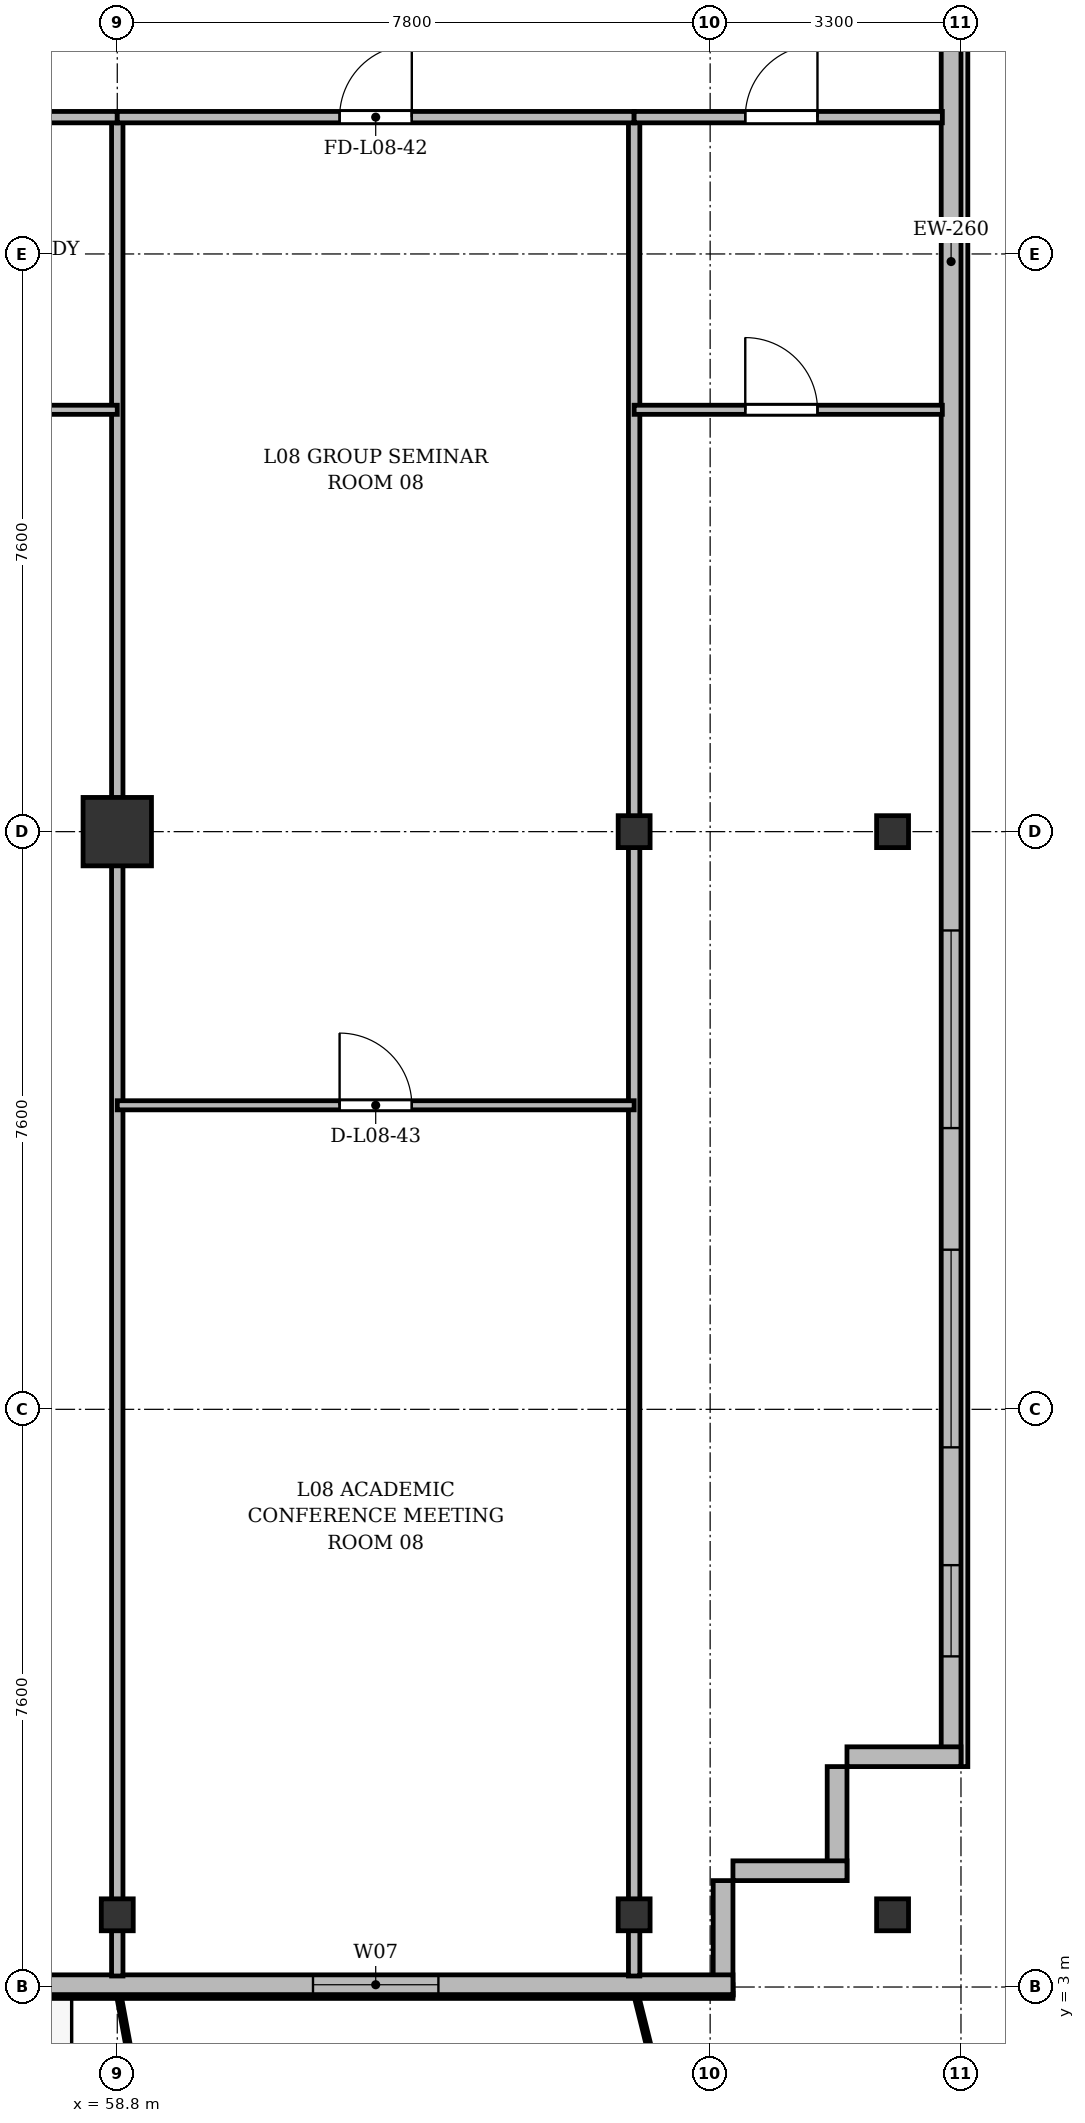
"""IFC4 building model, lengths in metres.
Left out: names, types, materials, properties, quantities, classifications, styles, units other than length and angle.
Written with IfcOpenShell. Run it as: python <this file> out.ifc"""

import sys

from ifc_helpers import new_model, si_unit, direction, frame, frame_2d, origin, origin_2d, place, context, subcontext, project, spatial, rectangle, i_section, extrude, source, transform, mapped, element, fill, save


model = new_model("IFC4")
c1 = context("Model", 3, precision=1e-05, world=origin(), true_north=direction((0.0, 1.0)))
c2 = subcontext(c1, "Body", "Model", "MODEL_VIEW")
j1 = project(units=[si_unit("LENGTHUNIT", "METRE"), si_unit("PLANEANGLEUNIT", "RADIAN")], contexts=[c1])
p1 = place(None, origin())
s1 = spatial("IfcSite", under=j1, at=p1, CompositionType="ELEMENT")
p2 = place(p1, origin())
s2 = spatial("IfcBuilding", under=s1, at=p2, CompositionType="ELEMENT")
p3 = place(p2, frame((0.0, 0.0, 34.3)))
s3 = spatial("IfcBuildingStorey", under=s2, at=p3, CompositionType="ELEMENT", Elevation=34.3)
m1 = source(origin(), c2, "Body", "SweptSolid", [
    extrude(i_section(OverallWidth=0.42, OverallDepth=0.42, WebThickness=0.026, FlangeThickness=0.04, at=origin_2d()), origin(), (0.0, 0.0, 1.0), 3.6),
])
p4 = place(p3, frame((58.8, 3.95, 0.0), z_axis=(0.0, 0.0, 1.0), x_axis=(1.0, 0.0, 0.0)))
e1 = element("IfcColumn", 1, at=p4, inside=s3, PredefinedType="COLUMN", context=c2, shape_type="MappedRepresentation", body=[
    mapped(m1, transform((0.0, 0.0, 0.0), x_axis=(1.0, 0.0, 0.0), y_axis=(0.0, 1.0, 0.0), z_axis=(0.0, 0.0, 1.0), scale=1.0)),
])
m2 = source(origin(), c2, "Body", "SweptSolid", [
    extrude(rectangle(XDim=0.9, YDim=0.9, at=origin_2d()), origin(), (0.0, 0.0, 1.0), 3.6),
])
p5 = place(p3, frame((58.8, 18.2, 0.0), z_axis=(0.0, 0.0, 1.0), x_axis=(1.0, 0.0, 0.0)))
e2 = element("IfcColumn", 2, at=p5, inside=s3, PredefinedType="COLUMN", context=c2, shape_type="MappedRepresentation", body=[
    mapped(m2, transform((0.0, 0.0, 0.0), x_axis=(1.0, 0.0, 0.0), y_axis=(0.0, 1.0, 0.0), z_axis=(0.0, 0.0, 1.0), scale=1.0)),
])
for number, where, z_axis, x_axis in (
    (3, (65.6, 3.95, 0.0), (0.0, 0.0, 1.0), (1.0, 0.0, 0.0)),
    (4, (65.6, 18.2, 0.0), (0.0, 0.0, 1.0), (1.0, 0.0, 0.0)),
    (5, (69.0, 3.95, 0.0), (0.0, 0.0, 1.0), (1.0, 0.0, 0.0)),
    (6, (69.0, 18.2, 0.0), (0.0, 0.0, 1.0), (1.0, 0.0, 0.0)),
):
    element("IfcColumn", number, at=place(p3, frame(where, z_axis=z_axis, x_axis=x_axis)), inside=s3, PredefinedType="COLUMN", context=c2, shape_type="MappedRepresentation", body=[
        mapped(m1, transform((0.0, 0.0, 0.0), x_axis=(1.0, 0.0, 0.0), y_axis=(0.0, 1.0, 0.0), z_axis=(0.0, 0.0, 1.0), scale=1.0)),
    ])
p6 = place(p3, frame((69.77, 45.5, 0.0), z_axis=(0.0, 0.0, 1.0), x_axis=(0.0, -1.0, 0.0)))
e7 = element("IfcWall", 7, at=p6, inside=s3, PredefinedType="SOLIDWALL", context=c2, shape_type="SweptSolid", body=[
    extrude(rectangle(XDim=39.6, YDim=0.26, at=frame_2d((19.8, 0.0))), origin(), (0.0, 0.0, 1.0), 3.34),
])
p7 = place(p6, frame((36.95, 0.0, 0.92)))
e8 = element("IfcOpeningElement", 8, at=p7, cuts=e7, PredefinedType="OPENING", context=c2, shape_type="SweptSolid", body=[
    extrude(rectangle(XDim=1.2, YDim=1.65, at=frame_2d((0.6, 0.825))), frame((0.0, 0.14, 0.0), z_axis=(0.0, -1.0, 0.0), x_axis=(1.0, 0.0, 0.0)), (0.0, 0.0, 1.0), 0.28),
])
p8 = place(p6, frame((32.8, 0.0, 0.92)))
e9 = element("IfcOpeningElement", 9, at=p8, cuts=e7, PredefinedType="OPENING", context=c2, shape_type="SweptSolid", body=[
    extrude(rectangle(XDim=2.6, YDim=1.9, at=frame_2d((1.3, 0.95))), frame((0.0, 0.14, 0.0), z_axis=(0.0, -1.0, 0.0), x_axis=(1.0, 0.0, 0.0)), (0.0, 0.0, 1.0), 0.28),
])
p9 = place(p6, frame((28.6, 0.0, 0.92)))
e10 = element("IfcOpeningElement", 10, at=p9, cuts=e7, PredefinedType="OPENING", context=c2, shape_type="SweptSolid", body=[
    extrude(rectangle(XDim=2.6, YDim=1.9, at=frame_2d((1.3, 0.95))), frame((0.0, 0.14, 0.0), z_axis=(0.0, -1.0, 0.0), x_axis=(1.0, 0.0, 0.0)), (0.0, 0.0, 1.0), 0.28),
])
p10 = place(p6, frame((7.4, 0.0, 0.92)))
e11 = element("IfcOpeningElement", 11, at=p10, cuts=e7, PredefinedType="OPENING", context=c2, shape_type="SweptSolid", body=[
    extrude(rectangle(XDim=2.6, YDim=1.9, at=frame_2d((1.3, 0.95))), frame((0.0, 0.14, 0.0), z_axis=(0.0, -1.0, 0.0), x_axis=(1.0, 0.0, 0.0)), (0.0, 0.0, 1.0), 0.28),
])
p11 = place(p6, frame((4.5, 0.0, 0.92)))
e12 = element("IfcOpeningElement", 12, at=p11, cuts=e7, PredefinedType="OPENING", context=c2, shape_type="SweptSolid", body=[
    extrude(rectangle(XDim=1.2, YDim=1.65, at=frame_2d((0.6, 0.825))), frame((0.0, 0.14, 0.0), z_axis=(0.0, -1.0, 0.0), x_axis=(1.0, 0.0, 0.0)), (0.0, 0.0, 1.0), 0.28),
])
p12 = place(p6, frame((1.15, 0.0, 0.92)))
e13 = element("IfcOpeningElement", 13, at=p12, cuts=e7, PredefinedType="OPENING", context=c2, shape_type="SweptSolid", body=[
    extrude(rectangle(XDim=1.2, YDim=1.65, at=frame_2d((0.6, 0.825))), frame((0.0, 0.14, 0.0), z_axis=(0.0, -1.0, 0.0), x_axis=(1.0, 0.0, 0.0)), (0.0, 0.0, 1.0), 0.28),
])
p13 = place(p3, frame((69.9, 6.03, 0.0), z_axis=(0.0, 0.0, 1.0), x_axis=(-1.0, 0.0, 0.0)))
e14 = element("IfcWall", 14, at=p13, inside=s3, PredefinedType="SOLIDWALL", context=c2, shape_type="SweptSolid", body=[
    extrude(rectangle(XDim=1.5, YDim=0.26, at=frame_2d((0.75, 0.0))), origin(), (0.0, 0.0, 1.0), 2.752),
])
for number, where, z_axis, x_axis in (
    (15, (68.27, 5.9, 0.0), (0.0, 0.0, 1.0), (0.0, -1.0, 0.0)),
    (16, (68.4, 4.53, 0.0), (0.0, 0.0, 1.0), (-1.0, 0.0, 0.0)),
):
    element("IfcWall", number, at=place(p3, frame(where, z_axis=z_axis, x_axis=x_axis)), inside=s3, PredefinedType="SOLIDWALL", context=c2, shape_type="SweptSolid", body=[
        extrude(rectangle(XDim=1.5, YDim=0.26, at=frame_2d((0.75, 0.0))), origin(), (0.0, 0.0, 1.0), 3.34),
    ])
p14 = place(p3, frame((66.77, 4.4, 0.0), z_axis=(0.0, 0.0, 1.0), x_axis=(0.0, -1.0, 0.0)))
e17 = element("IfcWall", 17, at=p14, inside=s3, PredefinedType="SOLIDWALL", context=c2, shape_type="SweptSolid", body=[
    extrude(rectangle(XDim=1.5, YDim=0.26, at=frame_2d((0.75, 0.0))), origin(), (0.0, 0.0, 1.0), 2.69),
])
p15 = place(p3, frame((66.9, 3.03, 0.0), z_axis=(0.0, 0.0, 1.0), x_axis=(-1.0, 0.0, 0.0)))
e18 = element("IfcWall", 18, at=p15, inside=s3, PredefinedType="SOLIDWALL", context=c2, shape_type="SweptSolid", body=[
    extrude(rectangle(XDim=59.4, YDim=0.26, at=frame_2d((29.7, 0.0))), origin(), (0.0, 0.0, 1.0), 3.34),
])
p16 = place(p15, frame((3.875, 0.0, 0.9)))
e19 = element("IfcOpeningElement", 19, at=p16, cuts=e18, PredefinedType="OPENING", context=c2, shape_type="SweptSolid", body=[
    extrude(rectangle(XDim=1.65, YDim=1.85, at=frame_2d((0.825, 0.925))), frame((0.0, 0.14, 0.0), z_axis=(0.0, -1.0, 0.0), x_axis=(1.0, 0.0, 0.0)), (0.0, 0.0, 1.0), 0.28),
])
p17 = place(p15, frame((9.565, 0.0, 0.0)))
e20 = element("IfcOpeningElement", 20, at=p17, cuts=e18, PredefinedType="OPENING", context=c2, shape_type="SweptSolid", body=[
    extrude(rectangle(XDim=1.2, YDim=2.2, at=frame_2d((0.6, 1.1))), frame((0.0, 0.14, 0.0), z_axis=(0.0, -1.0, 0.0), x_axis=(1.0, 0.0, 0.0)), (0.0, 0.0, 1.0), 0.28),
])
p18 = place(p15, frame((18.4, 0.0, 0.9)))
e21 = element("IfcOpeningElement", 21, at=p18, cuts=e18, PredefinedType="OPENING", context=c2, shape_type="SweptSolid", body=[
    extrude(rectangle(XDim=2.2, YDim=1.8, at=frame_2d((1.1, 0.9))), frame((0.0, 0.14, 0.0), z_axis=(0.0, -1.0, 0.0), x_axis=(1.0, 0.0, 0.0)), (0.0, 0.0, 1.0), 0.28),
])
p19 = place(p15, frame((28.95, 0.0, 0.9)))
e22 = element("IfcOpeningElement", 22, at=p19, cuts=e18, PredefinedType="OPENING", context=c2, shape_type="SweptSolid", body=[
    extrude(rectangle(XDim=1.5, YDim=1.75, at=frame_2d((0.75, 0.875))), frame((0.0, 0.14, 0.0), z_axis=(0.0, -1.0, 0.0), x_axis=(1.0, 0.0, 0.0)), (0.0, 0.0, 1.0), 0.28),
])
p20 = place(p15, frame((40.301, 0.0, 0.0)))
e23 = element("IfcOpeningElement", 23, at=p20, cuts=e18, PredefinedType="OPENING", context=c2, shape_type="SweptSolid", body=[
    extrude(rectangle(XDim=1.2, YDim=2.2, at=frame_2d((0.6, 1.1))), frame((0.0, 0.14, 0.0), z_axis=(0.0, -1.0, 0.0), x_axis=(1.0, 0.0, 0.0)), (0.0, 0.0, 1.0), 0.28),
])
p21 = place(p15, frame((46.575, 0.0, 0.9)))
e24 = element("IfcOpeningElement", 24, at=p21, cuts=e18, PredefinedType="OPENING", context=c2, shape_type="SweptSolid", body=[
    extrude(rectangle(XDim=1.65, YDim=1.85, at=frame_2d((0.825, 0.925))), frame((0.0, 0.14, 0.0), z_axis=(0.0, -1.0, 0.0), x_axis=(1.0, 0.0, 0.0)), (0.0, 0.0, 1.0), 0.28),
])
p22 = place(p15, frame((55.817, 0.0, 0.0)))
e25 = element("IfcOpeningElement", 25, at=p22, cuts=e18, PredefinedType="OPENING", context=c2, shape_type="SweptSolid", body=[
    extrude(rectangle(XDim=1.2, YDim=2.2, at=frame_2d((0.6, 1.1))), frame((0.0, 0.14, 0.0), z_axis=(0.0, -1.0, 0.0), x_axis=(1.0, 0.0, 0.0)), (0.0, 0.0, 1.0), 0.28),
])
for number, where, z_axis, x_axis in (
    (26, (58.8, 3.145, 0.0), (0.0, 0.0, 1.0), (0.0, 1.0, 0.0)),
    (27, (65.6, 3.145, 0.0), (0.0, 0.0, 1.0), (0.0, 1.0, 0.0)),
):
    element("IfcWall", number, at=place(p3, frame(where, z_axis=z_axis, x_axis=x_axis)), inside=s3, PredefinedType="PARTITIONING", context=c2, shape_type="SweptSolid", body=[
        extrude(rectangle(XDim=24.455, YDim=0.15, at=frame_2d((12.228, 0.0))), origin(), (0.0, 0.0, 1.0), 2.752),
    ])
p23 = place(p3, frame((51.0, 27.6, 0.0), z_axis=(0.0, 0.0, 1.0), x_axis=(1.0, 0.0, 0.0)))
e28 = element("IfcWall", 28, at=p23, inside=s3, PredefinedType="PARTITIONING", context=c2, shape_type="SweptSolid", body=[
    extrude(rectangle(XDim=7.8, YDim=0.15, at=frame_2d((3.9, 0.0))), origin(), (0.0, 0.0, 1.0), 2.752),
])
p24 = place(p23, frame((3.333, 0.0, 0.0)))
e29 = element("IfcOpeningElement", 29, at=p24, cuts=e28, PredefinedType="OPENING", context=c2, shape_type="SweptSolid", body=[
    extrude(rectangle(XDim=0.95, YDim=2.15, at=frame_2d((0.475, 1.075))), frame((0.0, 0.085, 0.0), z_axis=(0.0, -1.0, 0.0), x_axis=(1.0, 0.0, 0.0)), (0.0, 0.0, 1.0), 0.17),
])
p25 = place(p3, frame((51.0, 23.75, 0.0), z_axis=(0.0, 0.0, 1.0), x_axis=(1.0, 0.0, 0.0)))
e30 = element("IfcWall", 30, at=p25, inside=s3, PredefinedType="PARTITIONING", context=c2, shape_type="SweptSolid", body=[
    extrude(rectangle(XDim=7.8, YDim=0.12, at=frame_2d((3.9, 0.0))), origin(), (0.0, 0.0, 1.0), 2.752),
])
p26 = place(p25, frame((3.333, 0.0, 0.0)))
e31 = element("IfcOpeningElement", 31, at=p26, cuts=e30, PredefinedType="OPENING", context=c2, shape_type="SweptSolid", body=[
    extrude(rectangle(XDim=0.95, YDim=2.15, at=frame_2d((0.475, 1.075))), frame((0.0, 0.07, 0.0), z_axis=(0.0, -1.0, 0.0), x_axis=(1.0, 0.0, 0.0)), (0.0, 0.0, 1.0), 0.14),
])
p27 = place(p3, frame((58.8, 27.6, 0.0), z_axis=(0.0, 0.0, 1.0), x_axis=(1.0, 0.0, 0.0)))
e32 = element("IfcWall", 32, at=p27, inside=s3, PredefinedType="PARTITIONING", context=c2, shape_type="SweptSolid", body=[
    extrude(rectangle(XDim=6.8, YDim=0.15, at=frame_2d((3.4, 0.0))), origin(), (0.0, 0.0, 1.0), 2.752),
])
p28 = place(p27, frame((2.925, 0.0, 0.0)))
e33 = element("IfcOpeningElement", 33, at=p28, cuts=e32, PredefinedType="OPENING", context=c2, shape_type="SweptSolid", body=[
    extrude(rectangle(XDim=0.95, YDim=2.15, at=frame_2d((0.475, 1.075))), frame((0.0, 0.085, 0.0), z_axis=(0.0, -1.0, 0.0), x_axis=(1.0, 0.0, 0.0)), (0.0, 0.0, 1.0), 0.17),
])
p29 = place(p3, frame((58.8, 14.6, 0.0), z_axis=(0.0, 0.0, 1.0), x_axis=(1.0, 0.0, 0.0)))
e34 = element("IfcWall", 34, at=p29, inside=s3, PredefinedType="PARTITIONING", context=c2, shape_type="SweptSolid", body=[
    extrude(rectangle(XDim=6.8, YDim=0.12, at=frame_2d((3.4, 0.0))), origin(), (0.0, 0.0, 1.0), 2.752),
])
p30 = place(p29, frame((2.925, 0.0, 0.0)))
e35 = element("IfcOpeningElement", 35, at=p30, cuts=e34, PredefinedType="OPENING", context=c2, shape_type="SweptSolid", body=[
    extrude(rectangle(XDim=0.95, YDim=2.15, at=frame_2d((0.475, 1.075))), frame((0.0, 0.07, 0.0), z_axis=(0.0, -1.0, 0.0), x_axis=(1.0, 0.0, 0.0)), (0.0, 0.0, 1.0), 0.14),
])
p31 = place(p3, frame((65.6, 27.6, 0.0), z_axis=(0.0, 0.0, 1.0), x_axis=(1.0, 0.0, 0.0)))
e36 = element("IfcWall", 36, at=p31, inside=s3, PredefinedType="PARTITIONING", context=c2, shape_type="SweptSolid", body=[
    extrude(rectangle(XDim=4.055, YDim=0.15, at=frame_2d((2.027, 0.0))), origin(), (0.0, 0.0, 1.0), 2.752),
])
p32 = place(p31, frame((1.462, 0.0, 0.0)))
e37 = element("IfcOpeningElement", 37, at=p32, cuts=e36, PredefinedType="OPENING", context=c2, shape_type="SweptSolid", body=[
    extrude(rectangle(XDim=0.95, YDim=2.15, at=frame_2d((0.475, 1.075))), frame((0.0, 0.085, 0.0), z_axis=(0.0, -1.0, 0.0), x_axis=(1.0, 0.0, 0.0)), (0.0, 0.0, 1.0), 0.17),
])
p33 = place(p3, frame((65.6, 23.75, 0.0), z_axis=(0.0, 0.0, 1.0), x_axis=(1.0, 0.0, 0.0)))
e38 = element("IfcWall", 38, at=p33, inside=s3, PredefinedType="PARTITIONING", context=c2, shape_type="SweptSolid", body=[
    extrude(rectangle(XDim=4.055, YDim=0.12, at=frame_2d((2.027, 0.0))), origin(), (0.0, 0.0, 1.0), 2.752),
])
p34 = place(p33, frame((1.462, 0.0, 0.0)))
e39 = element("IfcOpeningElement", 39, at=p34, cuts=e38, PredefinedType="OPENING", context=c2, shape_type="SweptSolid", body=[
    extrude(rectangle(XDim=0.95, YDim=2.15, at=frame_2d((0.475, 1.075))), frame((0.0, 0.07, 0.0), z_axis=(0.0, -1.0, 0.0), x_axis=(1.0, 0.0, 0.0)), (0.0, 0.0, 1.0), 0.14),
])
m3 = source(origin(), c2, "Body", "SweptSolid", [
    extrude(rectangle(XDim=1.2, YDim=1.65, at=frame_2d((0.6, 0.825))), frame((0.0, 0.03, 0.0), z_axis=(0.0, -1.0, 0.0), x_axis=(1.0, 0.0, 0.0)), (0.0, 0.0, 1.0), 0.06),
])
p35 = place(p7, origin())
e40 = element("IfcWindow", 40, at=p35, inside=s3, PartitioningType="SINGLE_PANEL", PredefinedType="WINDOW", context=c2, shape_type="MappedRepresentation", body=[
    mapped(m3, transform((0.0, 0.0, 0.0), x_axis=(1.0, 0.0, 0.0), y_axis=(0.0, 1.0, 0.0), z_axis=(0.0, 0.0, 1.0), scale=1.0)),
])
fill(e8, e40)
m4 = source(origin(), c2, "Body", "SweptSolid", [
    extrude(rectangle(XDim=2.6, YDim=1.9, at=frame_2d((1.3, 0.95))), frame((0.0, 0.03, 0.0), z_axis=(0.0, -1.0, 0.0), x_axis=(1.0, 0.0, 0.0)), (0.0, 0.0, 1.0), 0.06),
])
p36 = place(p8, origin())
e41 = element("IfcWindow", 41, at=p36, inside=s3, PartitioningType="SINGLE_PANEL", PredefinedType="WINDOW", context=c2, shape_type="MappedRepresentation", body=[
    mapped(m4, transform((0.0, 0.0, 0.0), x_axis=(1.0, 0.0, 0.0), y_axis=(0.0, 1.0, 0.0), z_axis=(0.0, 0.0, 1.0), scale=1.0)),
])
fill(e9, e41)
p37 = place(p9, origin())
e42 = element("IfcWindow", 42, at=p37, inside=s3, PartitioningType="SINGLE_PANEL", PredefinedType="WINDOW", context=c2, shape_type="MappedRepresentation", body=[
    mapped(m4, transform((0.0, 0.0, 0.0), x_axis=(1.0, 0.0, 0.0), y_axis=(0.0, 1.0, 0.0), z_axis=(0.0, 0.0, 1.0), scale=1.0)),
])
fill(e10, e42)
m5 = source(origin(), c2, "Body", "SweptSolid", [
    extrude(rectangle(XDim=1.65, YDim=1.85, at=frame_2d((0.825, 0.925))), frame((0.0, 0.03, 0.0), z_axis=(0.0, -1.0, 0.0), x_axis=(1.0, 0.0, 0.0)), (0.0, 0.0, 1.0), 0.06),
])
p38 = place(p16, origin())
e43 = element("IfcWindow", 43, at=p38, inside=s3, PartitioningType="SINGLE_PANEL", PredefinedType="WINDOW", context=c2, shape_type="MappedRepresentation", body=[
    mapped(m5, transform((0.0, 0.0, 0.0), x_axis=(1.0, 0.0, 0.0), y_axis=(0.0, 1.0, 0.0), z_axis=(0.0, 0.0, 1.0), scale=1.0)),
])
fill(e19, e43)
m6 = source(origin(), c2, "Body", "SweptSolid", [
    extrude(rectangle(XDim=0.95, YDim=2.15, at=frame_2d((0.475, 1.075))), frame((0.0, 0.025, 0.0), z_axis=(0.0, -1.0, 0.0), x_axis=(1.0, 0.0, 0.0)), (0.0, 0.0, 1.0), 0.05),
])
p39 = place(p28, origin())
e44 = element("IfcDoor", 44, at=p39, inside=s3, OperationType="SINGLE_SWING_RIGHT", PredefinedType="DOOR", context=c2, shape_type="MappedRepresentation", body=[
    mapped(m6, transform((0.0, 0.0, 0.0), x_axis=(1.0, 0.0, 0.0), y_axis=(0.0, 1.0, 0.0), z_axis=(0.0, 0.0, 1.0), scale=1.0)),
])
fill(e33, e44)
p40 = place(p30, origin())
e45 = element("IfcDoor", 45, at=p40, inside=s3, OperationType="SINGLE_SWING_LEFT", PredefinedType="DOOR", context=c2, shape_type="MappedRepresentation", body=[
    mapped(m6, transform((0.0, 0.0, 0.0), x_axis=(1.0, 0.0, 0.0), y_axis=(0.0, 1.0, 0.0), z_axis=(0.0, 0.0, 1.0), scale=1.0)),
])
fill(e35, e45)
p41 = place(p32, origin())
e46 = element("IfcDoor", 46, at=p41, inside=s3, OperationType="SINGLE_SWING_RIGHT", PredefinedType="DOOR", context=c2, shape_type="MappedRepresentation", body=[
    mapped(m6, transform((0.0, 0.0, 0.0), x_axis=(1.0, 0.0, 0.0), y_axis=(0.0, 1.0, 0.0), z_axis=(0.0, 0.0, 1.0), scale=1.0)),
])
fill(e37, e46)
p42 = place(p34, origin())
e47 = element("IfcDoor", 47, at=p42, inside=s3, OperationType="SINGLE_SWING_LEFT", PredefinedType="DOOR", context=c2, shape_type="MappedRepresentation", body=[
    mapped(m6, transform((0.0, 0.0, 0.0), x_axis=(1.0, 0.0, 0.0), y_axis=(0.0, 1.0, 0.0), z_axis=(0.0, 0.0, 1.0), scale=1.0)),
])
fill(e39, e47)
save(model, sys.argv[1])
